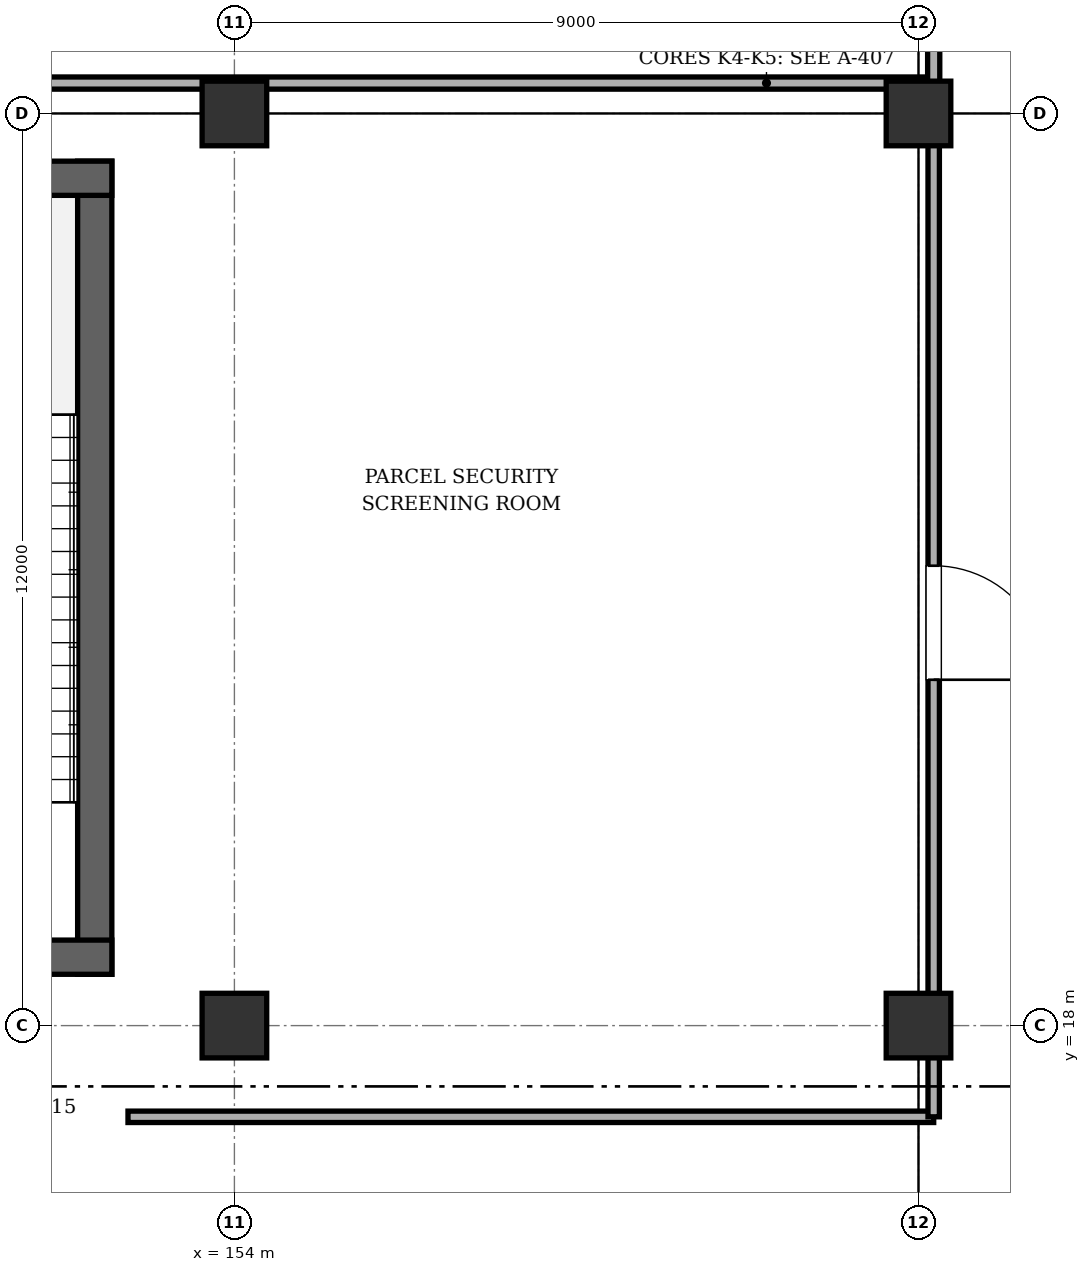
"""IFC4 building model, lengths in metres.
Left out: names, types, materials, properties, quantities, classifications, styles, units other than length and angle.
Written with IfcOpenShell. Run it as: python <this file> out.ifc"""

import sys

from ifc_helpers import new_model, si_unit, direction, frame, frame_2d, origin, origin_2d, place, context, subcontext, project, spatial, rectangle, extrude, element, fill, save


model = new_model("IFC4")
c1 = context("Model", 3, precision=1e-05, world=origin(), true_north=direction((0.0, 1.0)))
c2 = subcontext(c1, "Body", "Model", "MODEL_VIEW")
j1 = project(units=[si_unit("LENGTHUNIT", "METRE"), si_unit("PLANEANGLEUNIT", "RADIAN")], contexts=[c1])
p1 = place(None, origin())
s1 = spatial("IfcSite", under=j1, at=p1, CompositionType="ELEMENT")
p2 = place(p1, origin())
s2 = spatial("IfcBuilding", under=s1, at=p2, CompositionType="ELEMENT")
p3 = place(p2, frame((0.0, 0.0, -5.4)))
s3 = spatial("IfcBuildingStorey", under=s2, at=p3, CompositionType="ELEMENT", Elevation=-5.4)
for number, where, z_axis, x_axis in (
    (1, (154.0, 18.0, 0.0), (0.0, 0.0, 1.0), (1.0, 0.0, 0.0)),
    (2, (154.0, 30.0, 0.0), (0.0, 0.0, 1.0), (1.0, 0.0, 0.0)),
    (3, (163.0, 18.0, 0.0), (0.0, 0.0, 1.0), (1.0, 0.0, 0.0)),
    (4, (163.0, 30.0, 0.0), (0.0, 0.0, 1.0), (1.0, 0.0, 0.0)),
):
    element("IfcColumn", number, at=place(p3, frame(where, z_axis=z_axis, x_axis=x_axis)), inside=s3, PredefinedType="COLUMN", context=c2, shape_type="SweptSolid", body=[
        extrude(rectangle(XDim=0.85, YDim=0.85, at=origin_2d()), origin(), (0.0, 0.0, 1.0), 5.4),
    ])
p4 = place(p3, frame((152.163, 18.675, 0.0), z_axis=(0.0, 0.0, 1.0), x_axis=(0.0, 1.0, 0.0)))
e5 = element("IfcWall", 5, at=p4, inside=s3, PredefinedType="SHEAR", context=c2, shape_type="SweptSolid", body=[
    extrude(rectangle(XDim=10.698, YDim=0.45, at=frame_2d((5.349, 0.0))), origin(), (0.0, 0.0, 1.0), 5.1),
])
p5 = place(p3, frame((152.387, 29.147, 0.0), z_axis=(0.0, 0.0, 1.0), x_axis=(-1.0, 0.0, 0.0)))
e6 = element("IfcWall", 6, at=p5, inside=s3, PredefinedType="SHEAR", context=c2, shape_type="SweptSolid", body=[
    extrude(rectangle(XDim=4.52, YDim=0.45, at=frame_2d((2.26, 0.0))), origin(), (0.0, 0.0, 1.0), 5.1),
])
p6 = place(p3, frame((147.867, 18.9, 0.0), z_axis=(0.0, 0.0, 1.0), x_axis=(1.0, 0.0, 0.0)))
e7 = element("IfcWall", 7, at=p6, inside=s3, PredefinedType="SHEAR", context=c2, shape_type="SweptSolid", body=[
    extrude(rectangle(XDim=4.52, YDim=0.45, at=frame_2d((2.26, 0.0))), origin(), (0.0, 0.0, 1.0), 5.1),
])
p7 = place(p6, frame((0.95, 0.0, 0.0)))
e8 = element("IfcOpeningElement", 8, at=p7, cuts=e7, PredefinedType="OPENING", context=c2, shape_type="SweptSolid", body=[
    extrude(rectangle(XDim=1.3, YDim=2.1, at=frame_2d((0.65, 1.05))), frame((0.0, 0.235, 0.0), z_axis=(0.0, -1.0, 0.0), x_axis=(1.0, 0.0, 0.0)), (0.0, 0.0, 1.0), 0.47),
])
p8 = place(p3, frame((163.2, 30.4, 0.0), z_axis=(0.0, 0.0, 1.0), x_axis=(-1.0, 0.0, 0.0)))
e9 = element("IfcWall", 9, at=p8, inside=s3, PredefinedType="PARTITIONING", context=c2, shape_type="SweptSolid", body=[
    extrude(rectangle(XDim=26.4, YDim=0.16, at=frame_2d((13.2, 0.0))), origin(), (0.0, 0.0, 1.0), 4.4),
])
p9 = place(p3, frame((163.2, 53.4, 0.0), z_axis=(0.0, 0.0, 1.0), x_axis=(0.0, -1.0, 0.0)))
e10 = element("IfcWall", 10, at=p9, inside=s3, PredefinedType="PARTITIONING", context=c2, shape_type="SweptSolid", body=[
    extrude(rectangle(XDim=23.0, YDim=0.16, at=frame_2d((11.5, 0.0))), origin(), (0.0, 0.0, 1.0), 4.4),
])
p10 = place(p9, frame((12.9, 0.0, 0.0)))
e11 = element("IfcOpeningElement", 11, at=p10, cuts=e10, PredefinedType="OPENING", context=c2, shape_type="SweptSolid", body=[
    extrude(rectangle(XDim=1.8, YDim=2.2, at=frame_2d((0.9, 1.1))), frame((0.0, 0.09, 0.0), z_axis=(0.0, -1.0, 0.0), x_axis=(1.0, 0.0, 0.0)), (0.0, 0.0, 1.0), 0.18),
])
p11 = place(p9, frame((17.48, 0.0, 0.0)))
e12 = element("IfcOpeningElement", 12, at=p11, cuts=e10, PredefinedType="OPENING", context=c2, shape_type="SweptSolid", body=[
    extrude(rectangle(XDim=1.8, YDim=2.2, at=frame_2d((0.9, 1.1))), frame((0.0, 0.09, 0.0), z_axis=(0.0, -1.0, 0.0), x_axis=(1.0, 0.0, 0.0)), (0.0, 0.0, 1.0), 0.18),
])
p12 = place(p3, frame((163.2, 16.8, 0.0), z_axis=(0.0, 0.0, 1.0), x_axis=(-1.0, 0.0, 0.0)))
e13 = element("IfcWall", 13, at=p12, inside=s3, PredefinedType="PARTITIONING", context=c2, shape_type="SweptSolid", body=[
    extrude(rectangle(XDim=10.6, YDim=0.15, at=frame_2d((5.3, 0.0))), origin(), (0.0, 0.0, 1.0), 4.4),
])
p13 = place(p3, frame((163.2, 29.8, 0.0), z_axis=(0.0, 0.0, 1.0), x_axis=(0.0, -1.0, 0.0)))
e14 = element("IfcWall", 14, at=p13, inside=s3, PredefinedType="PARTITIONING", context=c2, shape_type="SweptSolid", body=[
    extrude(rectangle(XDim=13.0, YDim=0.15, at=frame_2d((6.5, 0.0))), origin(), (0.0, 0.0, 1.0), 4.4),
])
p14 = place(p13, frame((5.75, 0.0, 0.0)))
e15 = element("IfcOpeningElement", 15, at=p14, cuts=e14, PredefinedType="OPENING", context=c2, shape_type="SweptSolid", body=[
    extrude(rectangle(XDim=1.5, YDim=2.15, at=frame_2d((0.75, 1.075))), frame((0.0, 0.085, 0.0), z_axis=(0.0, -1.0, 0.0), x_axis=(1.0, 0.0, 0.0)), (0.0, 0.0, 1.0), 0.17),
])
p15 = place(p14, origin())
e16 = element("IfcDoor", 16, at=p15, inside=s3, OperationType="SINGLE_SWING_RIGHT", PredefinedType="DOOR", context=c2, shape_type="SweptSolid", body=[
    extrude(rectangle(XDim=1.5, YDim=2.15, at=frame_2d((0.75, 1.075))), frame((0.0, 0.025, 0.0), z_axis=(0.0, -1.0, 0.0), x_axis=(1.0, 0.0, 0.0)), (0.0, 0.0, 1.0), 0.05),
])
fill(e15, e16)
save(model, sys.argv[1])
